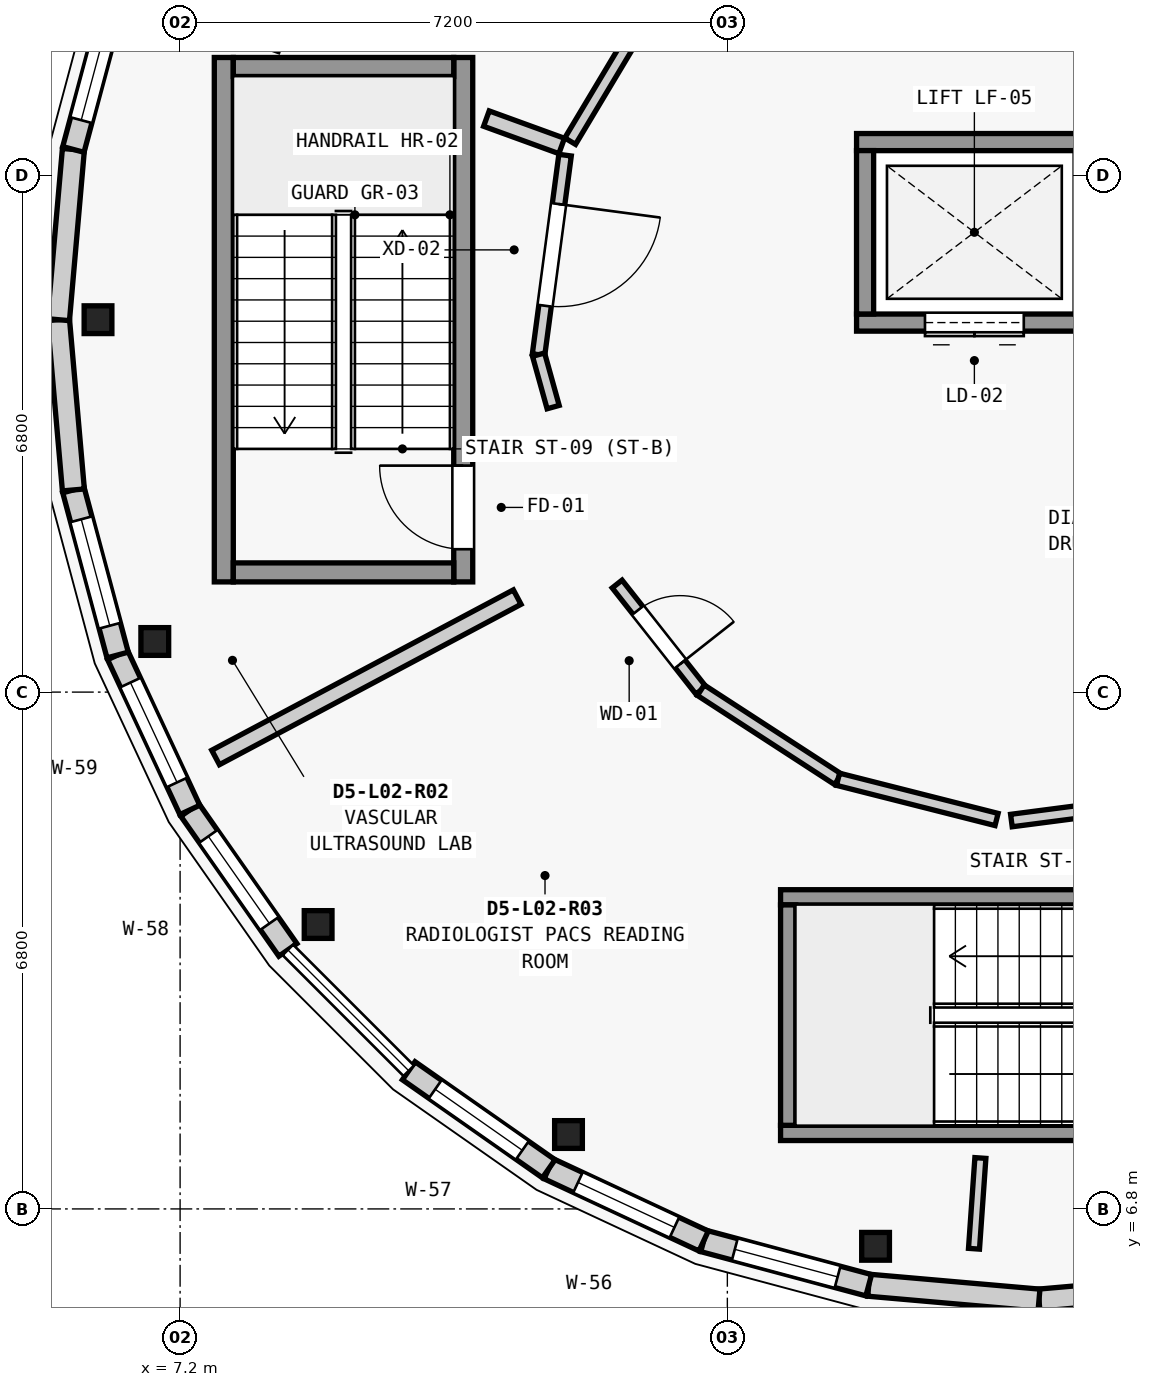
"""IFC4 building model, lengths in metres.
Left out: names, types, materials, properties, quantities, classifications, styles, units other than length and angle.
Written with IfcOpenShell. Run it as: python <this file> out.ifc"""

import sys

from ifc_helpers import new_model, si_unit, direction, frame, frame_2d, origin, origin_2d, place, context, subcontext, project, spatial, rectangle, extrude, element, fill, save


model = new_model("IFC4")
c1 = context("Model", 3, precision=1e-05, world=origin(), true_north=direction((0.0, 1.0)))
c2 = subcontext(c1, "Body", "Model", "MODEL_VIEW")
j1 = project(units=[si_unit("LENGTHUNIT", "METRE"), si_unit("PLANEANGLEUNIT", "RADIAN")], contexts=[c1])
p1 = place(None, origin())
s1 = spatial("IfcSite", under=j1, at=p1, CompositionType="ELEMENT")
p2 = place(p1, origin())
s2 = spatial("IfcBuilding", under=s1, at=p2, CompositionType="ELEMENT")
p3 = place(p2, frame((0.0, 0.0, 8.75)))
s3 = spatial("IfcBuildingStorey", under=s2, at=p3, CompositionType="ELEMENT", Elevation=8.75)
for number, where, z_axis, x_axis in (
    (1, (6.12, 18.5, 0.0), (0.0, 0.0, 1.0), (1.0, 0.0, 0.0)),
    (2, (6.867, 14.266, 0.0), (0.0, 0.0, 1.0), (1.0, 0.0, 0.0)),
    (3, (9.016, 10.542, 0.0), (0.0, 0.0, 1.0), (1.0, 0.0, 0.0)),
    (4, (12.31, 7.779, 0.0), (0.0, 0.0, 1.0), (1.0, 0.0, 0.0)),
    (5, (16.35, 6.308, 0.0), (0.0, 0.0, 1.0), (1.0, 0.0, 0.0)),
):
    element("IfcColumn", number, at=place(p3, frame(where, z_axis=z_axis, x_axis=x_axis)), inside=s3, PredefinedType="COLUMN", context=c2, shape_type="SweptSolid", body=[
        extrude(rectangle(XDim=0.365, YDim=0.365, at=origin_2d()), origin(), (0.0, 0.0, 1.0), 4.2),
    ])
for number, where, z_axis, x_axis in (
    (6, (20.74, 5.796, 0.0), (0.0, 0.0, 1.0), (-0.996, -0.087, 0.0)),
    (7, (18.5, 5.6, 0.0), (0.0, 0.0, 1.0), (-0.996, 0.087, 0.0)),
):
    element("IfcWall", number, at=place(p3, frame(where, z_axis=z_axis, x_axis=x_axis)), inside=s3, PredefinedType="ELEMENTEDWALL", context=c2, shape_type="SweptSolid", body=[
        extrude(rectangle(XDim=2.249, YDim=0.29, at=frame_2d((1.124, 0.0))), origin(), (0.0, 0.0, 1.0), 3.329),
    ])
p4 = place(p3, frame((16.26, 5.796, 0.0), z_axis=(0.0, 0.0, 1.0), x_axis=(-0.96592430538, 0.258824721145, 0.0)))
e8 = element("IfcWall", 8, at=p4, inside=s3, PredefinedType="ELEMENTEDWALL", context=c2, shape_type="SweptSolid", body=[
    extrude(rectangle(XDim=2.249, YDim=0.29, at=frame_2d((1.125, 0.0))), origin(), (0.0, 0.0, 1.0), 3.329),
])
p5 = place(p4, frame((0.424, 0.0, 0.85)))
e9 = element("IfcOpeningElement", 9, at=p5, cuts=e8, PredefinedType="OPENING", context=c2, shape_type="SweptSolid", body=[
    extrude(rectangle(XDim=1.4, YDim=1.25, at=frame_2d((0.7, 0.625))), frame((0.0, 0.155, 0.0), z_axis=(0.0, -1.0, 0.0), x_axis=(1.0, 0.0, 0.0)), (0.0, 0.0, 1.0), 0.31),
])
p6 = place(p3, frame((14.088, 6.378, 0.0), z_axis=(0.0, 0.0, 1.0), x_axis=(-0.906360600886, 0.422504983593, 0.0)))
e10 = element("IfcWall", 10, at=p6, inside=s3, PredefinedType="ELEMENTEDWALL", context=c2, shape_type="SweptSolid", body=[
    extrude(rectangle(XDim=2.248, YDim=0.29, at=frame_2d((1.124, 0.0))), origin(), (0.0, 0.0, 1.0), 3.329),
])
p7 = place(p6, frame((0.424, 0.0, 0.85)))
e11 = element("IfcOpeningElement", 11, at=p7, cuts=e10, PredefinedType="OPENING", context=c2, shape_type="SweptSolid", body=[
    extrude(rectangle(XDim=1.4, YDim=1.6, at=frame_2d((0.7, 0.8))), frame((0.0, 0.155, 0.0), z_axis=(0.0, -1.0, 0.0), x_axis=(1.0, 0.0, 0.0)), (0.0, 0.0, 1.0), 0.31),
])
p8 = place(p3, frame((12.05, 7.328, 0.0), z_axis=(0.0, 0.0, 1.0), x_axis=(-0.819104393925, 0.573644482107, 0.0)))
e12 = element("IfcWall", 12, at=p8, inside=s3, PredefinedType="ELEMENTEDWALL", context=c2, shape_type="SweptSolid", body=[
    extrude(rectangle(XDim=2.249, YDim=0.29, at=frame_2d((1.125, 0.0))), origin(), (0.0, 0.0, 1.0), 3.329),
])
p9 = place(p8, frame((0.424, 0.0, 0.85)))
e13 = element("IfcOpeningElement", 13, at=p9, cuts=e12, PredefinedType="OPENING", context=c2, shape_type="SweptSolid", body=[
    extrude(rectangle(XDim=1.4, YDim=1.9, at=frame_2d((0.7, 0.95))), frame((0.0, 0.155, 0.0), z_axis=(0.0, -1.0, 0.0), x_axis=(1.0, 0.0, 0.0)), (0.0, 0.0, 1.0), 0.31),
])
p10 = place(p3, frame((8.618, 10.208, 0.0), z_axis=(0.0, 0.0, 1.0), x_axis=(-0.573644482107, 0.819104393925, 0.0)))
e14 = element("IfcWall", 14, at=p10, inside=s3, PredefinedType="ELEMENTEDWALL", context=c2, shape_type="SweptSolid", body=[
    extrude(rectangle(XDim=2.249, YDim=0.29, at=frame_2d((1.125, 0.0))), origin(), (0.0, 0.0, 1.0), 3.329),
])
p11 = place(p10, frame((0.424, 0.0, 0.85)))
e15 = element("IfcOpeningElement", 15, at=p11, cuts=e14, PredefinedType="OPENING", context=c2, shape_type="SweptSolid", body=[
    extrude(rectangle(XDim=1.4, YDim=2.2, at=frame_2d((0.7, 1.1))), frame((0.0, 0.155, 0.0), z_axis=(0.0, -1.0, 0.0), x_axis=(1.0, 0.0, 0.0)), (0.0, 0.0, 1.0), 0.31),
])
p12 = place(p3, frame((7.328, 12.05, 0.0), z_axis=(0.0, 0.0, 1.0), x_axis=(-0.422504983593, 0.906360600886, 0.0)))
e16 = element("IfcWall", 16, at=p12, inside=s3, PredefinedType="ELEMENTEDWALL", context=c2, shape_type="SweptSolid", body=[
    extrude(rectangle(XDim=2.248, YDim=0.29, at=frame_2d((1.124, 0.0))), origin(), (0.0, 0.0, 1.0), 3.329),
])
p13 = place(p12, frame((0.399, 0.0, 0.85)))
e17 = element("IfcOpeningElement", 17, at=p13, cuts=e16, PredefinedType="OPENING", context=c2, shape_type="SweptSolid", body=[
    extrude(rectangle(XDim=1.45, YDim=1.45, at=frame_2d((0.725, 0.725))), frame((0.0, 0.155, 0.0), z_axis=(0.0, -1.0, 0.0), x_axis=(1.0, 0.0, 0.0)), (0.0, 0.0, 1.0), 0.31),
])
p14 = place(p3, frame((6.378, 14.088, 0.0), z_axis=(0.0, 0.0, 1.0), x_axis=(-0.258824721145, 0.96592430538, 0.0)))
e18 = element("IfcWall", 18, at=p14, inside=s3, PredefinedType="ELEMENTEDWALL", context=c2, shape_type="SweptSolid", body=[
    extrude(rectangle(XDim=2.249, YDim=0.29, at=frame_2d((1.125, 0.0))), origin(), (0.0, 0.0, 1.0), 3.329),
])
p15 = place(p14, frame((0.399, 0.0, 0.85)))
e19 = element("IfcOpeningElement", 19, at=p15, cuts=e18, PredefinedType="OPENING", context=c2, shape_type="SweptSolid", body=[
    extrude(rectangle(XDim=1.45, YDim=1.75, at=frame_2d((0.725, 0.875))), frame((0.0, 0.155, 0.0), z_axis=(0.0, -1.0, 0.0), x_axis=(1.0, 0.0, 0.0)), (0.0, 0.0, 1.0), 0.31),
])
for number, where, z_axis, x_axis in (
    (20, (5.796, 16.26, 0.0), (0.0, 0.0, 1.0), (-0.087, 0.996, 0.0)),
    (21, (5.6, 18.5, 0.0), (0.0, 0.0, 1.0), (0.087, 0.996, 0.0)),
):
    element("IfcWall", number, at=place(p3, frame(where, z_axis=z_axis, x_axis=x_axis)), inside=s3, PredefinedType="ELEMENTEDWALL", context=c2, shape_type="SweptSolid", body=[
        extrude(rectangle(XDim=2.249, YDim=0.29, at=frame_2d((1.124, 0.0))), origin(), (0.0, 0.0, 1.0), 3.329),
    ])
p16 = place(p3, frame((5.796, 20.74, 0.0), z_axis=(0.0, 0.0, 1.0), x_axis=(0.258824721145, 0.96592430538, 0.0)))
e22 = element("IfcWall", 22, at=p16, inside=s3, PredefinedType="ELEMENTEDWALL", context=c2, shape_type="SweptSolid", body=[
    extrude(rectangle(XDim=2.249, YDim=0.29, at=frame_2d((1.125, 0.0))), origin(), (0.0, 0.0, 1.0), 3.329),
])
p17 = place(p16, frame((0.399, 0.0, 0.85)))
e23 = element("IfcOpeningElement", 23, at=p17, cuts=e22, PredefinedType="OPENING", context=c2, shape_type="SweptSolid", body=[
    extrude(rectangle(XDim=1.45, YDim=2.05, at=frame_2d((0.725, 1.025))), frame((0.0, 0.155, 0.0), z_axis=(0.0, -1.0, 0.0), x_axis=(1.0, 0.0, 0.0)), (0.0, 0.0, 1.0), 0.31),
])
p18 = place(p3, frame((10.925, 15.05, 0.0), z_axis=(0.0, 0.0, 1.0), x_axis=(0.0, 1.0, 0.0)))
e24 = element("IfcWall", 24, at=p18, inside=s3, PredefinedType="SHEAR", context=c2, shape_type="SweptSolid", body=[
    extrude(rectangle(XDim=6.9, YDim=0.25, at=frame_2d((3.45, 0.0))), origin(), (0.0, 0.0, 1.0), 3.975),
])
p19 = place(p18, frame((0.43, 0.0, 0.0)))
e25 = element("IfcOpeningElement", 25, at=p19, cuts=e24, PredefinedType="OPENING", context=c2, shape_type="SweptSolid", body=[
    extrude(rectangle(XDim=1.1, YDim=2.15, at=frame_2d((0.55, 1.075))), frame((0.0, 0.135, 0.0), z_axis=(0.0, -1.0, 0.0), x_axis=(1.0, 0.0, 0.0)), (0.0, 0.0, 1.0), 0.27),
])
p20 = place(p3, frame((7.775, 15.05, 0.0), z_axis=(0.0, 0.0, 1.0), x_axis=(0.0, 1.0, 0.0)))
e26 = element("IfcWall", 26, at=p20, inside=s3, PredefinedType="SHEAR", context=c2, shape_type="SweptSolid", body=[
    extrude(rectangle(XDim=6.9, YDim=0.25, at=frame_2d((3.45, 0.0))), origin(), (0.0, 0.0, 1.0), 3.975),
])
for number, where, z_axis, x_axis in (
    (27, (10.8, 15.175, 0.0), (0.0, 0.0, 1.0), (-1.0, 0.0, 0.0)),
    (28, (10.8, 21.825, 0.0), (0.0, 0.0, 1.0), (-1.0, 0.0, 0.0)),
):
    element("IfcWall", number, at=place(p3, frame(where, z_axis=z_axis, x_axis=x_axis)), inside=s3, PredefinedType="SHEAR", context=c2, shape_type="SweptSolid", body=[
        extrude(rectangle(XDim=2.9, YDim=0.25, at=frame_2d((1.45, 0.0))), origin(), (0.0, 0.0, 1.0), 3.975),
    ])
p21 = place(p3, frame((21.9, 10.9, 0.0), z_axis=(0.0, 0.0, 1.0), x_axis=(-1.0, 0.0, 0.0)))
e29 = element("IfcWall", 29, at=p21, inside=s3, PredefinedType="SHEAR", context=c2, shape_type="SweptSolid", body=[
    extrude(rectangle(XDim=6.8, YDim=0.2, at=frame_2d((3.4, 0.0))), origin(), (0.0, 0.0, 1.0), 3.975),
])
p22 = place(p21, frame((0.38, 0.0, 0.0)))
e30 = element("IfcOpeningElement", 30, at=p22, cuts=e29, PredefinedType="OPENING", context=c2, shape_type="SweptSolid", body=[
    extrude(rectangle(XDim=1.05, YDim=2.15, at=frame_2d((0.525, 1.075))), frame((0.0, 0.11, 0.0), z_axis=(0.0, -1.0, 0.0), x_axis=(1.0, 0.0, 0.0)), (0.0, 0.0, 1.0), 0.22),
])
p23 = place(p3, frame((21.9, 7.8, 0.0), z_axis=(0.0, 0.0, 1.0), x_axis=(-1.0, 0.0, 0.0)))
e31 = element("IfcWall", 31, at=p23, inside=s3, PredefinedType="SHEAR", context=c2, shape_type="SweptSolid", body=[
    extrude(rectangle(XDim=6.8, YDim=0.2, at=frame_2d((3.4, 0.0))), origin(), (0.0, 0.0, 1.0), 3.975),
])
p24 = place(p3, frame((15.2, 10.8, 0.0), z_axis=(0.0, 0.0, 1.0), x_axis=(0.0, -1.0, 0.0)))
e32 = element("IfcWall", 32, at=p24, inside=s3, PredefinedType="SHEAR", context=c2, shape_type="SweptSolid", body=[
    extrude(rectangle(XDim=2.9, YDim=0.2, at=frame_2d((1.45, 0.0))), origin(), (0.0, 0.0, 1.0), 3.975),
])
p25 = place(p3, frame((16.1, 18.462, 0.0), z_axis=(0.0, 0.0, 1.0), x_axis=(1.0, 0.0, 0.0)))
e33 = element("IfcWall", 33, at=p25, inside=s3, PredefinedType="SHEAR", context=c2, shape_type="SweptSolid", body=[
    extrude(rectangle(XDim=3.1, YDim=0.225, at=frame_2d((1.55, 0.0))), origin(), (0.0, 0.0, 1.0), 3.975),
])
p26 = place(p25, frame((0.9, 0.0, 0.0)))
e34 = element("IfcOpeningElement", 34, at=p26, cuts=e33, PredefinedType="OPENING", context=c2, shape_type="SweptSolid", body=[
    extrude(rectangle(XDim=1.3, YDim=2.2, at=frame_2d((0.65, 1.1))), frame((0.0, 0.123, 0.0), z_axis=(0.0, -1.0, 0.0), x_axis=(1.0, 0.0, 0.0)), (0.0, 0.0, 1.0), 0.245),
])
p27 = place(p3, frame((16.1, 20.837, 0.0), z_axis=(0.0, 0.0, 1.0), x_axis=(1.0, 0.0, 0.0)))
e35 = element("IfcWall", 35, at=p27, inside=s3, PredefinedType="SHEAR", context=c2, shape_type="SweptSolid", body=[
    extrude(rectangle(XDim=3.1, YDim=0.225, at=frame_2d((1.55, 0.0))), origin(), (0.0, 0.0, 1.0), 3.975),
])
p28 = place(p3, frame((16.212, 18.575, 0.0), z_axis=(0.0, 0.0, 1.0), x_axis=(0.0, 1.0, 0.0)))
e36 = element("IfcWall", 36, at=p28, inside=s3, PredefinedType="SHEAR", context=c2, shape_type="SweptSolid", body=[
    extrude(rectangle(XDim=2.15, YDim=0.225, at=frame_2d((1.075, 0.0))), origin(), (0.0, 0.0, 1.0), 3.975),
])
p29 = place(p3, frame((12.22, 20.786, 0.0), z_axis=(0.0, 0.0, 1.0), x_axis=(-0.939759586286, 0.341836101053, 0.0)))
e37 = element("IfcWall", 37, at=p29, inside=s3, PredefinedType="SOLIDWALL", context=c2, shape_type="SweptSolid", body=[
    extrude(rectangle(XDim=1.053, YDim=0.215, at=frame_2d((0.527, 0.0))), origin(), (0.0, 0.0, 1.0), 3.304),
])
p30 = place(p3, frame((11.635, 14.85, 0.0), z_axis=(0.0, 0.0, 1.0), x_axis=(-0.882922222435, -0.469519274504, 0.0)))
e38 = element("IfcWall", 38, at=p30, inside=s3, PredefinedType="SOLIDWALL", context=c2, shape_type="SweptSolid", body=[
    extrude(rectangle(XDim=4.494, YDim=0.215, at=frame_2d((2.247, 0.0))), origin(), (0.0, 0.0, 1.0), 3.304),
])
p31 = place(p3, frame((17.729, 7.47, 0.0), z_axis=(0.0, 0.0, 1.0), x_axis=(-0.070159946762, -0.997535754683, 0.0)))
e39 = element("IfcWall", 39, at=p31, inside=s3, PredefinedType="PARTITIONING", context=c2, shape_type="SweptSolid", body=[
    extrude(rectangle(XDim=1.197, YDim=0.145, at=frame_2d((0.599, 0.0))), origin(), (0.0, 0.0, 1.0), 3.304),
])
p32 = place(p3, frame((13.515, 22.826, 0.0), z_axis=(0.0, 0.0, 1.0), x_axis=(-0.513466768532, -0.858109478804, 0.0)))
e40 = element("IfcWall", 40, at=p32, inside=s3, PredefinedType="PARTITIONING", context=c2, shape_type="SweptSolid", body=[
    extrude(rectangle(XDim=2.304, YDim=0.165, at=frame_2d((1.152, 0.0))), origin(), (0.0, 0.0, 1.0), 3.304),
])
p33 = place(p3, frame((12.265, 20.665, 0.0), z_axis=(0.0, 0.0, 1.0), x_axis=(-0.131747018073, -0.991283371811, 0.0)))
e41 = element("IfcWall", 41, at=p33, inside=s3, PredefinedType="PARTITIONING", context=c2, shape_type="SweptSolid", body=[
    extrude(rectangle(XDim=2.648, YDim=0.165, at=frame_2d((1.324, 0.0))), origin(), (0.0, 0.0, 1.0), 3.304),
])
p34 = place(p33, frame((0.649, 0.0, 0.0)))
e42 = element("IfcOpeningElement", 42, at=p34, cuts=e41, PredefinedType="OPENING", context=c2, shape_type="SweptSolid", body=[
    extrude(rectangle(XDim=1.35, YDim=2.22, at=frame_2d((0.675, 1.11))), frame((0.0, 0.093, 0.0), z_axis=(0.0, -1.0, 0.0), x_axis=(1.0, 0.0, 0.0)), (0.0, 0.0, 1.0), 0.185),
])
p35 = place(p3, frame((11.916, 18.04, 0.0), z_axis=(0.0, 0.0, 1.0), x_axis=(0.267960344866, -0.963429942227, 0.0)))
e43 = element("IfcWall", 43, at=p35, inside=s3, PredefinedType="PARTITIONING", context=c2, shape_type="SweptSolid", body=[
    extrude(rectangle(XDim=0.716, YDim=0.165, at=frame_2d((0.358, 0.0))), origin(), (0.0, 0.0, 1.0), 3.304),
])
p36 = place(p3, frame((12.95, 15.022, 0.0), z_axis=(0.0, 0.0, 1.0), x_axis=(0.619021057701, -0.785374388507, 0.0)))
e44 = element("IfcWall", 44, at=p36, inside=s3, PredefinedType="PARTITIONING", context=c2, shape_type="SweptSolid", body=[
    extrude(rectangle(XDim=1.779, YDim=0.165, at=frame_2d((0.889, 0.0))), origin(), (0.0, 0.0, 1.0), 3.304),
])
p37 = place(p36, frame((0.44, 0.0, 0.0)))
e45 = element("IfcOpeningElement", 45, at=p37, cuts=e44, PredefinedType="OPENING", context=c2, shape_type="SweptSolid", body=[
    extrude(rectangle(XDim=0.9, YDim=2.1, at=frame_2d((0.45, 1.05))), frame((0.0, 0.093, 0.0), z_axis=(0.0, -1.0, 0.0), x_axis=(1.0, 0.0, 0.0)), (0.0, 0.0, 1.0), 0.185),
])
p38 = place(p3, frame((14.051, 13.625, 0.0), z_axis=(0.0, 0.0, 1.0), x_axis=(0.838674212558, -0.544633422763, 0.0)))
e46 = element("IfcWall", 46, at=p38, inside=s3, PredefinedType="PARTITIONING", context=c2, shape_type="SweptSolid", body=[
    extrude(rectangle(XDim=2.152, YDim=0.165, at=frame_2d((1.076, 0.0))), origin(), (0.0, 0.0, 1.0), 3.304),
])
p39 = place(p3, frame((15.856, 12.453, 0.0), z_axis=(0.0, 0.0, 1.0), x_axis=(0.969336371772, -0.245737661664, 0.0)))
e47 = element("IfcWall", 47, at=p39, inside=s3, PredefinedType="PARTITIONING", context=c2, shape_type="SweptSolid", body=[
    extrude(rectangle(XDim=2.152, YDim=0.165, at=frame_2d((1.076, 0.0))), origin(), (0.0, 0.0, 1.0), 3.304),
])
p40 = place(p3, frame((18.137, 11.91, 0.0), z_axis=(0.0, 0.0, 1.0), x_axis=(0.991627158641, 0.129133954659, 0.0)))
e48 = element("IfcWall", 48, at=p40, inside=s3, PredefinedType="PARTITIONING", context=c2, shape_type="SweptSolid", body=[
    extrude(rectangle(XDim=1.526, YDim=0.165, at=frame_2d((0.763, 0.0))), origin(), (0.0, 0.0, 1.0), 3.304),
])
p41 = place(p5, origin())
e49 = element("IfcWindow", 49, at=p41, inside=s3, PartitioningType="SINGLE_PANEL", PredefinedType="WINDOW", context=c2, shape_type="SweptSolid", body=[
    extrude(rectangle(XDim=1.4, YDim=1.25, at=frame_2d((0.7, 0.625))), frame((0.0, 0.03, 0.0), z_axis=(0.0, -1.0, 0.0), x_axis=(1.0, 0.0, 0.0)), (0.0, 0.0, 1.0), 0.06),
])
fill(e9, e49)
p42 = place(p7, origin())
e50 = element("IfcWindow", 50, at=p42, inside=s3, PartitioningType="SINGLE_PANEL", PredefinedType="WINDOW", context=c2, shape_type="SweptSolid", body=[
    extrude(rectangle(XDim=1.4, YDim=1.6, at=frame_2d((0.7, 0.8))), frame((0.0, 0.03, 0.0), z_axis=(0.0, -1.0, 0.0), x_axis=(1.0, 0.0, 0.0)), (0.0, 0.0, 1.0), 0.06),
])
fill(e11, e50)
p43 = place(p9, origin())
e51 = element("IfcWindow", 51, at=p43, inside=s3, PartitioningType="SINGLE_PANEL", PredefinedType="WINDOW", context=c2, shape_type="SweptSolid", body=[
    extrude(rectangle(XDim=1.4, YDim=1.9, at=frame_2d((0.7, 0.95))), frame((0.0, 0.03, 0.0), z_axis=(0.0, -1.0, 0.0), x_axis=(1.0, 0.0, 0.0)), (0.0, 0.0, 1.0), 0.06),
])
fill(e13, e51)
p44 = place(p11, origin())
e52 = element("IfcWindow", 52, at=p44, inside=s3, PartitioningType="SINGLE_PANEL", PredefinedType="WINDOW", context=c2, shape_type="SweptSolid", body=[
    extrude(rectangle(XDim=1.4, YDim=2.2, at=frame_2d((0.7, 1.1))), frame((0.0, 0.03, 0.0), z_axis=(0.0, -1.0, 0.0), x_axis=(1.0, 0.0, 0.0)), (0.0, 0.0, 1.0), 0.06),
])
fill(e15, e52)
p45 = place(p13, origin())
e53 = element("IfcWindow", 53, at=p45, inside=s3, PartitioningType="SINGLE_PANEL", PredefinedType="WINDOW", context=c2, shape_type="SweptSolid", body=[
    extrude(rectangle(XDim=1.45, YDim=1.45, at=frame_2d((0.725, 0.725))), frame((0.0, 0.03, 0.0), z_axis=(0.0, -1.0, 0.0), x_axis=(1.0, 0.0, 0.0)), (0.0, 0.0, 1.0), 0.06),
])
fill(e17, e53)
p46 = place(p15, origin())
e54 = element("IfcWindow", 54, at=p46, inside=s3, PartitioningType="SINGLE_PANEL", PredefinedType="WINDOW", context=c2, shape_type="SweptSolid", body=[
    extrude(rectangle(XDim=1.45, YDim=1.75, at=frame_2d((0.725, 0.875))), frame((0.0, 0.03, 0.0), z_axis=(0.0, -1.0, 0.0), x_axis=(1.0, 0.0, 0.0)), (0.0, 0.0, 1.0), 0.06),
])
fill(e19, e54)
p47 = place(p17, origin())
e55 = element("IfcWindow", 55, at=p47, inside=s3, PartitioningType="SINGLE_PANEL", PredefinedType="WINDOW", context=c2, shape_type="SweptSolid", body=[
    extrude(rectangle(XDim=1.45, YDim=2.05, at=frame_2d((0.725, 1.025))), frame((0.0, 0.03, 0.0), z_axis=(0.0, -1.0, 0.0), x_axis=(1.0, 0.0, 0.0)), (0.0, 0.0, 1.0), 0.06),
])
fill(e23, e55)
p48 = place(p19, origin())
e56 = element("IfcDoor", 56, at=p48, inside=s3, OperationType="SINGLE_SWING_RIGHT", PredefinedType="DOOR", context=c2, shape_type="SweptSolid", body=[
    extrude(rectangle(XDim=1.1, YDim=2.15, at=frame_2d((0.55, 1.075))), frame((0.0, 0.025, 0.0), z_axis=(0.0, -1.0, 0.0), x_axis=(1.0, 0.0, 0.0)), (0.0, 0.0, 1.0), 0.05),
])
fill(e25, e56)
p49 = place(p26, origin())
e57 = element("IfcDoor", 57, at=p49, inside=s3, OperationType="DOUBLE_DOOR_SLIDING", PredefinedType="DOOR", context=c2, shape_type="SweptSolid", body=[
    extrude(rectangle(XDim=1.3, YDim=2.2, at=frame_2d((0.65, 1.1))), frame((0.0, 0.025, 0.0), z_axis=(0.0, -1.0, 0.0), x_axis=(1.0, 0.0, 0.0)), (0.0, 0.0, 1.0), 0.05),
])
fill(e34, e57)
p50 = place(p34, origin())
e58 = element("IfcDoor", 58, at=p50, inside=s3, OperationType="SINGLE_SWING_LEFT", PredefinedType="DOOR", context=c2, shape_type="SweptSolid", body=[
    extrude(rectangle(XDim=1.35, YDim=2.22, at=frame_2d((0.675, 1.11))), frame((0.0, 0.025, 0.0), z_axis=(0.0, -1.0, 0.0), x_axis=(1.0, 0.0, 0.0)), (0.0, 0.0, 1.0), 0.05),
])
fill(e42, e58)
p51 = place(p37, origin())
e59 = element("IfcDoor", 59, at=p51, inside=s3, OperationType="SINGLE_SWING_RIGHT", PredefinedType="DOOR", context=c2, shape_type="SweptSolid", body=[
    extrude(rectangle(XDim=0.9, YDim=2.1, at=frame_2d((0.45, 1.05))), frame((0.0, 0.025, 0.0), z_axis=(0.0, -1.0, 0.0), x_axis=(1.0, 0.0, 0.0)), (0.0, 0.0, 1.0), 0.05),
])
fill(e45, e59)
save(model, sys.argv[1])
